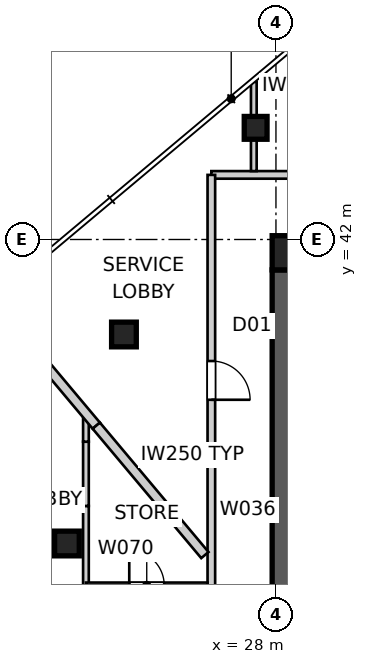
"""IFC4 building model, lengths in metres.
Left out: names, types, materials, properties, quantities, classifications, styles, units other than length and angle.
Written with IfcOpenShell. Run it as: python <this file> out.ifc"""

import sys

from ifc_helpers import new_model, si_unit, direction, frame, frame_2d, origin, origin_2d, place, context, subcontext, project, spatial, polyline, rectangle, outline, extrude, element, fill, save


model = new_model("IFC4")
c1 = context("Model", 3, precision=1e-05, world=origin(), true_north=direction((0.0, 1.0)))
c2 = subcontext(c1, "Body", "Model", "MODEL_VIEW")
j1 = project(units=[si_unit("LENGTHUNIT", "METRE"), si_unit("PLANEANGLEUNIT", "RADIAN")], contexts=[c1])
p1 = place(None, origin())
s1 = spatial("IfcSite", under=j1, at=p1, CompositionType="ELEMENT")
p2 = place(p1, origin())
s2 = spatial("IfcBuilding", under=s1, at=p2, CompositionType="ELEMENT")
p3 = place(p2, frame((0.0, 0.0, 299.8)))
s3 = spatial("IfcBuildingStorey", under=s2, at=p3, CompositionType="ELEMENT", Elevation=299.8)
p4 = place(p3, frame((28.35, 41.2, 0.0), z_axis=(0.0, 0.0, 1.0), x_axis=(0.0, -1.0, 0.0)))
e1 = element("IfcWall", 1, at=p4, inside=s3, PredefinedType="SHEAR", context=c2, shape_type="SweptSolid", body=[
    extrude(outline(polyline([(0.0, -0.45), (22.4, -0.45), (22.4, -0.025), (22.85, -0.025), (22.85, 0.025), (22.4, 0.025), (22.4, 0.45), (0.0, 0.45), (0.0, 0.025), (-0.45, 0.025), (-0.45, -0.025), (0.0, -0.025), (0.0, -0.45)])), origin(), (0.0, 0.0, 1.0), 4.5),
])
p5 = place(p4, frame((11.14, 0.0, 0.0)))
e2 = element("IfcOpeningElement", 2, at=p5, cuts=e1, PredefinedType="OPENING", context=c2, shape_type="SweptSolid", body=[
    extrude(rectangle(XDim=1.02, YDim=2.4, at=frame_2d((0.51, 1.2))), frame((0.0, 0.46, 0.0), z_axis=(0.0, -1.0, 0.0), x_axis=(1.0, 0.0, 0.0)), (0.0, 0.0, 1.0), 0.92),
])
p6 = place(p3, frame((28.35, 41.65, 0.0), z_axis=(0.0, 0.0, 1.0), x_axis=(1.0, 0.0, 0.0)))
e3 = element("IfcColumn", 3, at=p6, inside=s3, PredefinedType="COLUMN", context=c2, shape_type="SweptSolid", body=[
    extrude(rectangle(XDim=0.9, YDim=0.9, at=origin_2d()), origin(), (0.0, 0.0, 1.0), 4.5),
])
p7 = place(p3, frame((27.466, 44.938, 0.0), z_axis=(0.0, 0.0, 1.0), x_axis=(1.0, 0.0, 0.0)))
e4 = element("IfcColumn", 4, at=p7, inside=s3, PredefinedType="COLUMN", context=c2, shape_type="SweptSolid", body=[
    extrude(rectangle(XDim=0.6, YDim=0.6, at=origin_2d()), origin(), (0.0, 0.0, 1.0), 4.5),
])
for number, where, z_axis, x_axis in (
    (5, (24.0, 39.5, 0.0), (0.0, 0.0, 1.0), (1.0, 0.0, 0.0)),
    (6, (22.5, 34.0, 0.0), (0.0, 0.0, 1.0), (1.0, 0.0, 0.0)),
):
    element("IfcColumn", number, at=place(p3, frame(where, z_axis=z_axis, x_axis=x_axis)), inside=s3, PredefinedType="COLUMN", context=c2, shape_type="SweptSolid", body=[
        extrude(rectangle(XDim=0.65, YDim=0.65, at=origin_2d()), origin(), (0.0, 0.0, 1.0), 4.5),
    ])
p8 = place(p3, frame((53.7, 43.7, 0.0), z_axis=(0.0, 0.0, 1.0), x_axis=(-1.0, 0.0, 0.0)))
e7 = element("IfcWall", 7, at=p8, inside=s3, PredefinedType="PARTITIONING", context=c2, shape_type="SweptSolid", body=[
    extrude(rectangle(XDim=27.4, YDim=0.2, at=frame_2d((13.7, 0.0))), origin(), (0.0, 0.0, 1.0), 4.3),
])
p9 = place(p8, frame((20.621, 0.0, 0.0)))
e8 = element("IfcOpeningElement", 8, at=p9, cuts=e7, PredefinedType="OPENING", context=c2, shape_type="SweptSolid", body=[
    extrude(rectangle(XDim=1.02, YDim=2.34, at=frame_2d((0.51, 1.17))), frame((0.0, 0.11, 0.0), z_axis=(0.0, -1.0, 0.0), x_axis=(1.0, 0.0, 0.0)), (0.0, 0.0, 1.0), 0.22),
])
p10 = place(p8, frame((6.053, 0.0, 0.0)))
e9 = element("IfcOpeningElement", 9, at=p10, cuts=e7, PredefinedType="OPENING", context=c2, shape_type="SweptSolid", body=[
    extrude(rectangle(XDim=1.02, YDim=2.34, at=frame_2d((0.51, 1.17))), frame((0.0, 0.11, 0.0), z_axis=(0.0, -1.0, 0.0), x_axis=(1.0, 0.0, 0.0)), (0.0, 0.0, 1.0), 0.22),
])
p11 = place(p8, frame((12.574, 0.0, 0.0)))
e10 = element("IfcOpeningElement", 10, at=p11, cuts=e7, PredefinedType="OPENING", context=c2, shape_type="SweptSolid", body=[
    extrude(rectangle(XDim=1.02, YDim=2.34, at=frame_2d((0.51, 1.17))), frame((0.0, 0.11, 0.0), z_axis=(0.0, -1.0, 0.0), x_axis=(1.0, 0.0, 0.0)), (0.0, 0.0, 1.0), 0.22),
])
p12 = place(p3, frame((26.3, 43.7, 0.0), z_axis=(0.0, 0.0, 1.0), x_axis=(0.0, -1.0, 0.0)))
e11 = element("IfcWall", 11, at=p12, inside=s3, PredefinedType="PARTITIONING", context=c2, shape_type="SweptSolid", body=[
    extrude(rectangle(XDim=27.4, YDim=0.2, at=frame_2d((13.7, 0.0))), origin(), (0.0, 0.0, 1.0), 4.3),
])
p13 = place(p12, frame((4.898, 0.0, 0.0)))
e12 = element("IfcOpeningElement", 12, at=p13, cuts=e11, PredefinedType="OPENING", context=c2, shape_type="SweptSolid", body=[
    extrude(rectangle(XDim=1.02, YDim=2.34, at=frame_2d((0.51, 1.17))), frame((0.0, 0.11, 0.0), z_axis=(0.0, -1.0, 0.0), x_axis=(1.0, 0.0, 0.0)), (0.0, 0.0, 1.0), 0.22),
])
p14 = place(p12, frame((17.042, 0.0, 0.0)))
e13 = element("IfcOpeningElement", 13, at=p14, cuts=e11, PredefinedType="OPENING", context=c2, shape_type="SweptSolid", body=[
    extrude(rectangle(XDim=1.02, YDim=2.34, at=frame_2d((0.51, 1.17))), frame((0.0, 0.11, 0.0), z_axis=(0.0, -1.0, 0.0), x_axis=(1.0, 0.0, 0.0)), (0.0, 0.0, 1.0), 0.22),
])
p15 = place(p12, frame((23.434, 0.0, 0.0)))
e14 = element("IfcOpeningElement", 14, at=p15, cuts=e11, PredefinedType="OPENING", context=c2, shape_type="SweptSolid", body=[
    extrude(rectangle(XDim=1.02, YDim=2.34, at=frame_2d((0.51, 1.17))), frame((0.0, 0.11, 0.0), z_axis=(0.0, -1.0, 0.0), x_axis=(1.0, 0.0, 0.0)), (0.0, 0.0, 1.0), 0.22),
])
p16 = place(p12, frame((11.727, 0.0, 0.0)))
e15 = element("IfcOpeningElement", 15, at=p16, cuts=e11, PredefinedType="OPENING", context=c2, shape_type="SweptSolid", body=[
    extrude(rectangle(XDim=1.02, YDim=2.34, at=frame_2d((0.51, 1.17))), frame((0.0, 0.11, 0.0), z_axis=(0.0, -1.0, 0.0), x_axis=(1.0, 0.0, 0.0)), (0.0, 0.0, 1.0), 0.22),
])
p17 = place(p3, frame((21.146, 39.635, 0.0), z_axis=(0.0, 0.0, 1.0), x_axis=(0.642823301165, -0.766014492995, 0.0)))
e16 = element("IfcWall", 16, at=p17, inside=s3, PredefinedType="PARTITIONING", context=c2, shape_type="SweptSolid", body=[
    extrude(rectangle(XDim=3.308, YDim=0.25, at=frame_2d((1.654, 0.0))), origin(), (0.0, 0.0, 1.0), 3.688),
])
p18 = place(p3, frame((23.272, 37.101, 0.0), z_axis=(0.0, 0.0, 1.0), x_axis=(0.642778620996, -0.766051985436, 0.0)))
e17 = element("IfcWall", 17, at=p18, inside=s3, PredefinedType="PARTITIONING", context=c2, shape_type="SweptSolid", body=[
    extrude(rectangle(XDim=4.446, YDim=0.25, at=frame_2d((2.223, 0.0))), origin(), (0.0, 0.0, 1.0), 4.3),
])
p19 = place(p3, frame((23.0, 25.143, 0.0), z_axis=(0.0, 0.0, 1.0), x_axis=(0.0, 1.0, 0.0)))
e18 = element("IfcWall", 18, at=p19, inside=s3, PredefinedType="SOLIDWALL", context=c2, shape_type="SweptSolid", body=[
    extrude(rectangle(XDim=9.845, YDim=0.15, at=frame_2d((4.922, 0.0))), origin(), (0.0, 0.0, 1.0), 4.3),
])
p20 = place(p19, frame((5.86, 0.0, 0.0)))
e19 = element("IfcOpeningElement", 19, at=p20, cuts=e18, PredefinedType="OPENING", context=c2, shape_type="SweptSolid", body=[
    extrude(rectangle(XDim=0.92, YDim=2.1, at=frame_2d((0.46, 1.05))), frame((0.0, 0.085, 0.0), z_axis=(0.0, -1.0, 0.0), x_axis=(1.0, 0.0, 0.0)), (0.0, 0.0, 1.0), 0.17),
])
p21 = place(p3, frame((23.0, 34.988, 0.0), z_axis=(0.0, 0.0, 1.0), x_axis=(0.0, 1.0, 0.0)))
e20 = element("IfcWall", 20, at=p21, inside=s3, PredefinedType="SOLIDWALL", context=c2, shape_type="SweptSolid", body=[
    extrude(rectangle(XDim=1.69, YDim=0.15, at=frame_2d((0.845, 0.0))), origin(), (0.0, 0.0, 1.0), 3.3),
])
p22 = place(p3, frame((23.0, 36.678, 0.0), z_axis=(0.0, 0.0, 1.0), x_axis=(0.0, 1.0, 0.0)))
e21 = element("IfcWall", 21, at=p22, inside=s3, PredefinedType="SOLIDWALL", context=c2, shape_type="SweptSolid", body=[
    extrude(rectangle(XDim=0.747, YDim=0.15, at=frame_2d((0.373, 0.0))), origin(), (0.0, 0.0, 1.0), 4.3),
])
p23 = place(p3, frame((27.417, 46.15, 0.0), z_axis=(0.0, 0.0, 1.0), x_axis=(0.0, -1.0, 0.0)))
e22 = element("IfcWall", 22, at=p23, inside=s3, PredefinedType="SOLIDWALL", context=c2, shape_type="SweptSolid", body=[
    extrude(rectangle(XDim=2.35, YDim=0.15, at=frame_2d((1.175, 0.0))), origin(), (0.0, 0.0, 1.0), 4.3),
])
p24 = place(p3, frame((23.0, 32.897, 0.0), z_axis=(0.0, 0.0, 1.0), x_axis=(1.0, 0.0, 0.0)))
e23 = element("IfcWall", 23, at=p24, inside=s3, PredefinedType="SOLIDWALL", context=c2, shape_type="SweptSolid", body=[
    extrude(rectangle(XDim=3.2, YDim=0.15, at=frame_2d((1.6, 0.0))), origin(), (0.0, 0.0, 1.0), 3.772),
])
p25 = place(p24, frame((1.14, 0.0, 0.0)))
e24 = element("IfcOpeningElement", 24, at=p25, cuts=e23, PredefinedType="OPENING", context=c2, shape_type="SweptSolid", body=[
    extrude(rectangle(XDim=0.92, YDim=2.1, at=frame_2d((0.46, 1.05))), frame((0.0, 0.085, 0.0), z_axis=(0.0, -1.0, 0.0), x_axis=(1.0, 0.0, 0.0)), (0.0, 0.0, 1.0), 0.17),
])
p26 = place(p13, origin())
e25 = element("IfcDoor", 25, at=p26, inside=s3, OperationType="SINGLE_SWING_RIGHT", PredefinedType="DOOR", context=c2, shape_type="SweptSolid", body=[
    extrude(rectangle(XDim=1.02, YDim=2.34, at=frame_2d((0.51, 1.17))), frame((0.0, 0.025, 0.0), z_axis=(0.0, -1.0, 0.0), x_axis=(1.0, 0.0, 0.0)), (0.0, 0.0, 1.0), 0.05),
])
fill(e12, e25)
save(model, sys.argv[1])
